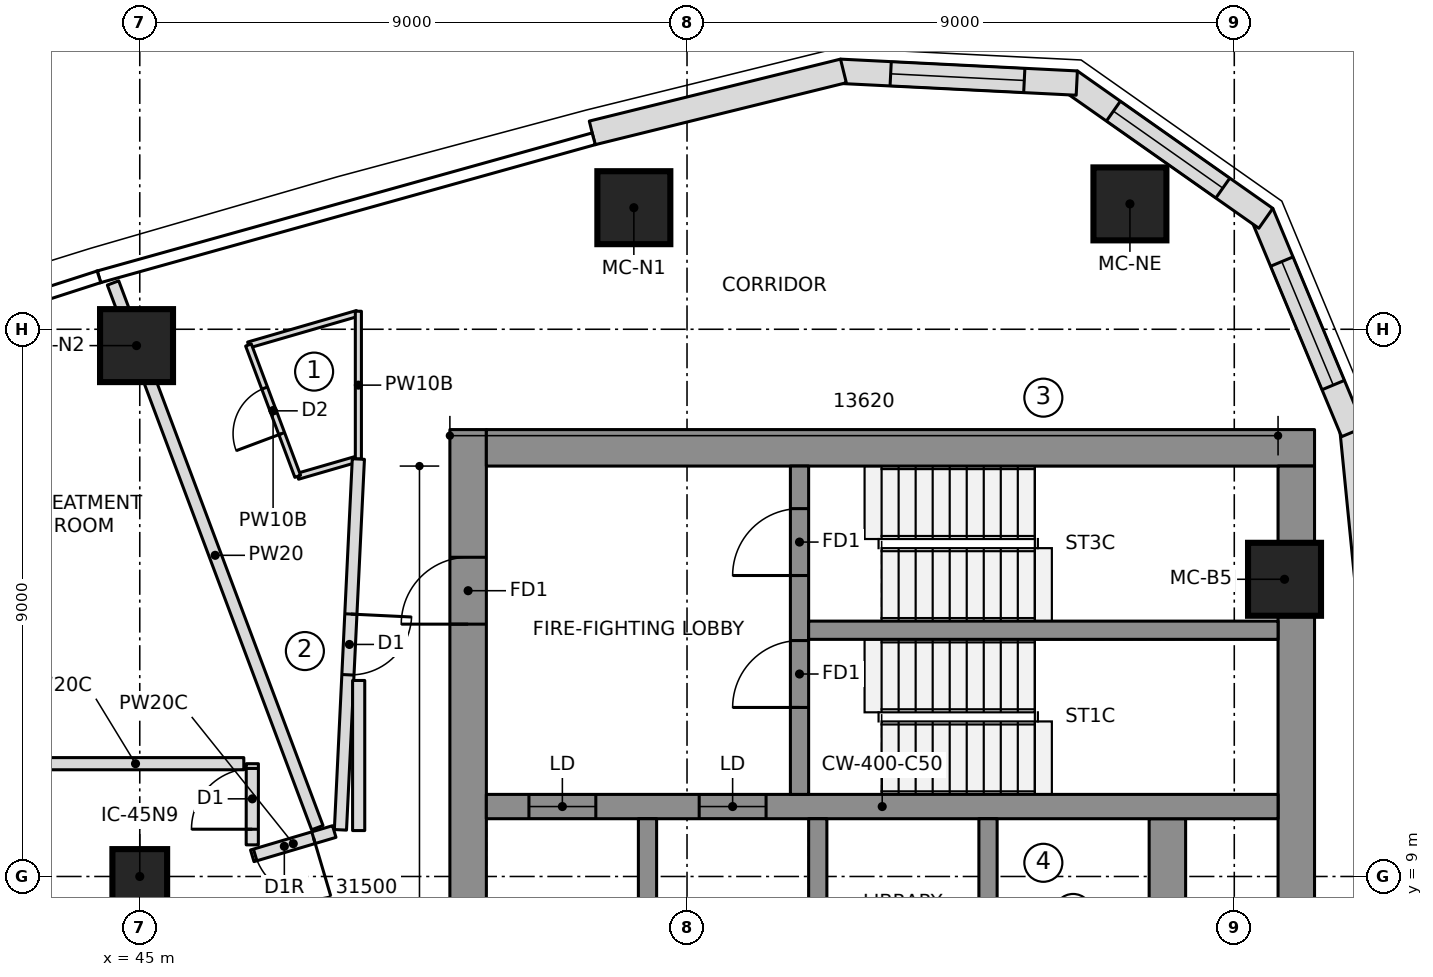
"""IFC4 building model, lengths in metres.
Left out: names, types, materials, properties, quantities, classifications, styles, units other than length and angle.
Written with IfcOpenShell. Run it as: python <this file> out.ifc"""

import sys

from ifc_helpers import new_model, si_unit, direction, frame, frame_2d, origin, origin_2d, place, context, subcontext, project, spatial, polyline, rectangle, outline, extrude, element, fill, save


model = new_model("IFC4")
c1 = context("Model", 3, precision=1e-05, world=origin(), true_north=direction((0.0, 1.0)))
c2 = subcontext(c1, "Body", "Model", "MODEL_VIEW")
j1 = project(units=[si_unit("LENGTHUNIT", "METRE"), si_unit("PLANEANGLEUNIT", "RADIAN")], contexts=[c1])
p1 = place(None, origin())
s1 = spatial("IfcSite", under=j1, at=p1, CompositionType="ELEMENT")
p2 = place(p1, origin())
s2 = spatial("IfcBuilding", under=s1, at=p2, CompositionType="ELEMENT")
p3 = place(p2, frame((0.0, 0.0, 245.65)))
s3 = spatial("IfcBuildingStorey", under=s2, at=p3, CompositionType="ELEMENT", Elevation=245.65)
p4 = place(p3, frame((50.4, 6.65, 0.0), z_axis=(0.0, 0.0, 1.0), x_axis=(0.0, 1.0, 0.0)))
e1 = element("IfcWall", 1, at=p4, inside=s3, PredefinedType="SHEAR", context=c2, shape_type="SweptSolid", body=[
    extrude(rectangle(XDim=9.7, YDim=0.6, at=frame_2d((4.85, 0.0))), origin(), (0.0, 0.0, 1.0), 3.55),
])
p5 = place(p4, frame((6.5, 0.0, 0.0)))
e2 = element("IfcOpeningElement", 2, at=p5, cuts=e1, PredefinedType="OPENING", context=c2, shape_type="SweptSolid", body=[
    extrude(rectangle(XDim=1.1, YDim=2.1, at=frame_2d((0.55, 1.05))), frame((0.0, 0.31, 0.0), z_axis=(0.0, -1.0, 0.0), x_axis=(1.0, 0.0, 0.0)), (0.0, 0.0, 1.0), 0.62),
])
p6 = place(p3, frame((50.7, 16.05, 0.0), z_axis=(0.0, 0.0, 1.0), x_axis=(1.0, 0.0, 0.0)))
e3 = element("IfcWall", 3, at=p6, inside=s3, PredefinedType="SHEAR", context=c2, shape_type="SweptSolid", body=[
    extrude(rectangle(XDim=13.62, YDim=0.6, at=frame_2d((6.81, 0.0))), origin(), (0.0, 0.0, 1.0), 3.55),
])
p7 = place(p3, frame((64.02, 7.502, 0.0), z_axis=(0.0, 0.0, 1.0), x_axis=(0.0, 1.0, 0.0)))
e4 = element("IfcWall", 4, at=p7, inside=s3, PredefinedType="SHEAR", context=c2, shape_type="SweptSolid", body=[
    extrude(rectangle(XDim=8.248, YDim=0.6, at=frame_2d((4.124, 0.0))), origin(), (0.0, 0.0, 1.0), 3.55),
])
p8 = place(p3, frame((61.9, -9.95, 0.0), z_axis=(0.0, 0.0, 1.0), x_axis=(0.0, 1.0, 0.0)))
e5 = element("IfcWall", 5, at=p8, inside=s3, PredefinedType="SHEAR", context=c2, shape_type="SweptSolid", body=[
    extrude(rectangle(XDim=19.9, YDim=0.6, at=frame_2d((9.95, 0.0))), origin(), (0.0, 0.0, 1.0), 3.55),
])
p9 = place(p3, frame((50.7, 10.15, 0.0), z_axis=(0.0, 0.0, 1.0), x_axis=(1.0, 0.0, 0.0)))
e6 = element("IfcWall", 6, at=p9, inside=s3, PredefinedType="SHEAR", context=c2, shape_type="SweptSolid", body=[
    extrude(rectangle(XDim=13.02, YDim=0.4, at=frame_2d((6.51, 0.0))), origin(), (0.0, 0.0, 1.0), 3.55),
])
p10 = place(p9, frame((0.7, 0.0, 0.0)))
e7 = element("IfcOpeningElement", 7, at=p10, cuts=e6, PredefinedType="OPENING", context=c2, shape_type="SweptSolid", body=[
    extrude(rectangle(XDim=1.1, YDim=2.1, at=frame_2d((0.55, 1.05))), frame((0.0, 0.21, 0.0), z_axis=(0.0, -1.0, 0.0), x_axis=(1.0, 0.0, 0.0)), (0.0, 0.0, 1.0), 0.42),
])
p11 = place(p9, frame((3.5, 0.0, 0.0)))
e8 = element("IfcOpeningElement", 8, at=p11, cuts=e6, PredefinedType="OPENING", context=c2, shape_type="SweptSolid", body=[
    extrude(rectangle(XDim=1.1, YDim=2.1, at=frame_2d((0.55, 1.05))), frame((0.0, 0.21, 0.0), z_axis=(0.0, -1.0, 0.0), x_axis=(1.0, 0.0, 0.0)), (0.0, 0.0, 1.0), 0.42),
])
for number, where, z_axis, x_axis in (
    (9, (53.35, 6.95, 0.0), (0.0, 0.0, 1.0), (0.0, 1.0, 0.0)),
    (10, (56.15, 6.95, 0.0), (0.0, 0.0, 1.0), (0.0, 1.0, 0.0)),
    (11, (58.95, 6.95, 0.0), (0.0, 0.0, 1.0), (0.0, 1.0, 0.0)),
):
    element("IfcWall", number, at=place(p3, frame(where, z_axis=z_axis, x_axis=x_axis)), inside=s3, PredefinedType="SHEAR", context=c2, shape_type="SweptSolid", body=[
        extrude(rectangle(XDim=3.0, YDim=0.3, at=frame_2d((1.5, 0.0))), origin(), (0.0, 0.0, 1.0), 3.55),
    ])
p12 = place(p3, frame((55.85, 10.35, 0.0), z_axis=(0.0, 0.0, 1.0), x_axis=(0.0, 1.0, 0.0)))
e12 = element("IfcWall", 12, at=p12, inside=s3, PredefinedType="SHEAR", context=c2, shape_type="SweptSolid", body=[
    extrude(rectangle(XDim=5.4, YDim=0.3, at=frame_2d((2.7, 0.0))), origin(), (0.0, 0.0, 1.0), 3.55),
])
p13 = place(p12, frame((1.43, 0.0, 0.0)))
e13 = element("IfcOpeningElement", 13, at=p13, cuts=e12, PredefinedType="OPENING", context=c2, shape_type="SweptSolid", body=[
    extrude(rectangle(XDim=1.1, YDim=2.1, at=frame_2d((0.55, 1.05))), frame((0.0, 0.16, 0.0), z_axis=(0.0, -1.0, 0.0), x_axis=(1.0, 0.0, 0.0)), (0.0, 0.0, 1.0), 0.32),
])
p14 = place(p12, frame((3.6, 0.0, 0.0)))
e14 = element("IfcOpeningElement", 14, at=p14, cuts=e12, PredefinedType="OPENING", context=c2, shape_type="SweptSolid", body=[
    extrude(rectangle(XDim=1.1, YDim=2.1, at=frame_2d((0.55, 1.05))), frame((0.0, 0.16, 0.0), z_axis=(0.0, -1.0, 0.0), x_axis=(1.0, 0.0, 0.0)), (0.0, 0.0, 1.0), 0.32),
])
p15 = place(p3, frame((56.0, 13.05, 0.0), z_axis=(0.0, 0.0, 1.0), x_axis=(1.0, 0.0, 0.0)))
e15 = element("IfcWall", 15, at=p15, inside=s3, PredefinedType="SHEAR", context=c2, shape_type="SweptSolid", body=[
    extrude(rectangle(XDim=7.72, YDim=0.3, at=frame_2d((3.86, 0.0))), origin(), (0.0, 0.0, 1.0), 3.55),
])
for number, where, z_axis, x_axis in (
    (16, (63.826, 13.888, 0.0), (0.0, 0.0, 1.0), (1.0, 0.0, 0.0)),
    (17, (61.284, 20.062, 0.0), (0.0, 0.0, 1.0), (1.0, 0.0, 0.0)),
    (18, (53.125, 20.0, 0.0), (0.0, 0.0, 1.0), (1.0, 0.0, 0.0)),
    (19, (44.947, 17.731, 0.0), (0.0, 0.0, 1.0), (1.0, 0.0, 0.0)),
):
    element("IfcColumn", number, at=place(p3, frame(where, z_axis=z_axis, x_axis=x_axis)), inside=s3, PredefinedType="COLUMN", context=c2, shape_type="SweptSolid", body=[
        extrude(rectangle(XDim=1.2, YDim=1.2, at=origin_2d()), origin(), (0.0, 0.0, 1.0), 3.55),
    ])
p16 = place(p3, frame((45.0, 9.0, 0.0), z_axis=(0.0, 0.0, 1.0), x_axis=(1.0, 0.0, 0.0)))
e20 = element("IfcColumn", 20, at=p16, inside=s3, PredefinedType="COLUMN", context=c2, shape_type="SweptSolid", body=[
    extrude(rectangle(XDim=0.9, YDim=0.9, at=origin_2d()), origin(), (0.0, 0.0, 1.0), 3.55),
])
p17 = place(p3, frame((65.342, 12.264, 0.0), z_axis=(0.0, 0.0, 1.0), x_axis=(-0.098718218066, 0.995115427185, 0.0)))
e21 = element("IfcWall", 21, at=p17, inside=s3, PredefinedType="NOTDEFINED", context=c2, shape_type="SweptSolid", body=[
    extrude(outline(polyline([(-0.003, -0.2), (4.123, -0.2), (4.063, 0.2), (0.003, 0.2), (-0.003, -0.2)])), origin(), (0.0, 0.0, 1.0), 3.25),
])
p18 = place(p3, frame((64.938, 16.337, 0.0), z_axis=(0.0, 0.0, 1.0), x_axis=(-0.3844335483, 0.923152667191, 0.0)))
e22 = element("IfcWall", 22, at=p18, inside=s3, PredefinedType="NOTDEFINED", context=c2, shape_type="SweptSolid", body=[
    extrude(outline(polyline([(-0.03, -0.2), (3.871, -0.2), (3.756, 0.2), (0.03, 0.2), (-0.03, -0.2)])), origin(), (0.0, 0.0, 1.0), 3.25),
])
p19 = place(p18, frame((0.807, 0.0, 0.6)))
e23 = element("IfcOpeningElement", 23, at=p19, cuts=e22, PredefinedType="OPENING", context=c2, shape_type="SweptSolid", body=[
    extrude(outline(polyline([(0.0, 1.35), (0.084, 1.771), (0.322, 2.128), (0.679, 2.366), (1.1, 2.45), (1.521, 2.366), (1.878, 2.128), (2.116, 1.771), (2.2, 1.35), (2.2, 1.1), (2.116, 0.679), (1.878, 0.322), (1.521, 0.084), (1.1, 0.0), (0.679, 0.084), (0.322, 0.322), (0.084, 0.679), (0.0, 1.1), (0.0, 1.35)])), frame((0.0, 0.21, 0.0), z_axis=(0.0, -1.0, 0.0), x_axis=(1.0, 0.0, 0.0)), (0.0, 0.0, 1.0), 0.42),
])
p20 = place(p3, frame((63.471, 19.858, 0.0), z_axis=(0.0, 0.0, 1.0), x_axis=(-0.817942545532, 0.575299915009, 0.0)))
e24 = element("IfcWall", 24, at=p20, inside=s3, PredefinedType="NOTDEFINED", context=c2, shape_type="SweptSolid", body=[
    extrude(outline(polyline([(-0.058, -0.2), (3.871, -0.2), (3.756, 0.2), (0.058, 0.2), (-0.058, -0.2)])), origin(), (0.0, 0.0, 1.0), 3.25),
])
p21 = place(p20, frame((0.807, 0.0, 0.6)))
e25 = element("IfcOpeningElement", 25, at=p21, cuts=e24, PredefinedType="OPENING", context=c2, shape_type="SweptSolid", body=[
    extrude(outline(polyline([(0.0, 1.35), (0.084, 1.771), (0.322, 2.128), (0.679, 2.366), (1.1, 2.45), (1.521, 2.366), (1.878, 2.128), (2.116, 1.771), (2.2, 1.35), (2.2, 1.1), (2.116, 0.679), (1.878, 0.322), (1.521, 0.084), (1.1, 0.0), (0.679, 0.084), (0.322, 0.322), (0.084, 0.679), (0.0, 1.1), (0.0, 1.35)])), frame((0.0, 0.21, 0.0), z_axis=(0.0, -1.0, 0.0), x_axis=(1.0, 0.0, 0.0)), (0.0, 0.0, 1.0), 0.42),
])
p22 = place(p3, frame((60.352, 22.052, 0.0), z_axis=(0.0, 0.0, 1.0), x_axis=(-0.998758875872, 0.049806705046, 0.0)))
e26 = element("IfcWall", 26, at=p22, inside=s3, PredefinedType="NOTDEFINED", context=c2, shape_type="SweptSolid", body=[
    extrude(outline(polyline([(-0.058, -0.2), (3.843, -0.2), (3.784, 0.2), (0.058, 0.2), (-0.058, -0.2)])), origin(), (0.0, 0.0, 1.0), 3.25),
])
p23 = place(p22, frame((0.807, 0.0, 0.6)))
e27 = element("IfcOpeningElement", 27, at=p23, cuts=e26, PredefinedType="OPENING", context=c2, shape_type="SweptSolid", body=[
    extrude(outline(polyline([(0.0, 1.35), (0.084, 1.771), (0.322, 2.128), (0.679, 2.366), (1.1, 2.45), (1.521, 2.366), (1.878, 2.128), (2.116, 1.771), (2.2, 1.35), (2.2, 1.1), (2.116, 0.679), (1.878, 0.322), (1.521, 0.084), (1.1, 0.0), (0.679, 0.084), (0.322, 0.322), (0.084, 0.679), (0.0, 1.1), (0.0, 1.35)])), frame((0.0, 0.21, 0.0), z_axis=(0.0, -1.0, 0.0), x_axis=(1.0, 0.0, 0.0)), (0.0, 0.0, 1.0), 0.42),
])
p24 = place(p3, frame((56.543, 22.242, 0.0), z_axis=(0.0, 0.0, 1.0), x_axis=(-0.970902342456, -0.23947576373, 0.0)))
e28 = element("IfcWall", 28, at=p24, inside=s3, PredefinedType="NOTDEFINED", context=c2, shape_type="SweptSolid", body=[
    extrude(outline(polyline([(-0.029, -0.2), (4.226, -0.2), (4.226, 0.2), (0.029, 0.2), (-0.029, -0.2)])), origin(), (0.0, 0.0, 1.0), 3.25),
])
p25 = place(p3, frame((48.198, 9.739, 0.0), z_axis=(0.0, 0.0, 1.0), x_axis=(-0.958866391875, -0.283857785753, 0.0)))
e29 = element("IfcWall", 29, at=p25, inside=s3, PredefinedType="PARTITIONING", context=c2, shape_type="SweptSolid", body=[
    extrude(rectangle(XDim=1.406, YDim=0.2, at=frame_2d((0.703, 0.0))), origin(), (0.0, 0.0, 1.0), 3.25),
])
p26 = place(p25, frame((0.356, 0.0, 0.0)))
e30 = element("IfcOpeningElement", 30, at=p26, cuts=e29, PredefinedType="OPENING", context=c2, shape_type="SweptSolid", body=[
    extrude(rectangle(XDim=1.0, YDim=2.1, at=frame_2d((0.5, 1.05))), frame((0.0, 0.11, 0.0), z_axis=(0.0, -1.0, 0.0), x_axis=(1.0, 0.0, 0.0)), (0.0, 0.0, 1.0), 0.22),
])
p27 = place(p3, frame((47.92, 9.803, 0.0), z_axis=(0.0, 0.0, 1.0), x_axis=(-0.351123441588, 0.936329177569, 0.0)))
e31 = element("IfcWall", 31, at=p27, inside=s3, PredefinedType="PARTITIONING", context=c2, shape_type="SweptSolid", body=[
    extrude(rectangle(XDim=9.568, YDim=0.2, at=frame_2d((4.784, 0.0))), origin(), (0.0, 0.0, 1.0), 3.25),
])
p28 = place(p3, frame((46.788, 17.741, 0.0), z_axis=(0.0, 0.0, 1.0), x_axis=(0.960473980386, 0.278369777458, 0.0)))
e32 = element("IfcWall", 32, at=p28, inside=s3, PredefinedType="PARTITIONING", context=c2, shape_type="SweptSolid", body=[
    extrude(rectangle(XDim=1.864, YDim=0.1, at=frame_2d((0.932, 0.0))), origin(), (0.0, 0.0, 1.0), 3.25),
])
p29 = place(p3, frame((48.576, 15.865, 0.0), z_axis=(0.0, 0.0, 1.0), x_axis=(-0.960468222897, -0.278389642057, 0.0)))
e33 = element("IfcWall", 33, at=p29, inside=s3, PredefinedType="PARTITIONING", context=c2, shape_type="SweptSolid", body=[
    extrude(rectangle(XDim=1.019, YDim=0.1, at=frame_2d((0.51, 0.0))), origin(), (0.0, 0.0, 1.0), 3.25),
])
p30 = place(p3, frame((47.598, 15.582, 0.0), z_axis=(0.0, 0.0, 1.0), x_axis=(-0.351158236187, 0.936316128857, 0.0)))
e34 = element("IfcWall", 34, at=p30, inside=s3, PredefinedType="PARTITIONING", context=c2, shape_type="SweptSolid", body=[
    extrude(rectangle(XDim=2.307, YDim=0.1, at=frame_2d((1.153, 0.0))), origin(), (0.0, 0.0, 1.0), 3.25),
])
p31 = place(p30, frame((0.75, 0.0, 0.0)))
e35 = element("IfcOpeningElement", 35, at=p31, cuts=e34, PredefinedType="OPENING", context=c2, shape_type="SweptSolid", body=[
    extrude(rectangle(XDim=0.8, YDim=2.1, at=frame_2d((0.4, 1.05))), frame((0.0, 0.06, 0.0), z_axis=(0.0, -1.0, 0.0), x_axis=(1.0, 0.0, 0.0)), (0.0, 0.0, 1.0), 0.12),
])
p32 = place(p3, frame((48.595, 18.296, 0.0), z_axis=(0.0, 0.0, 1.0), x_axis=(0.0, -1.0, 0.0)))
e36 = element("IfcWall", 36, at=p32, inside=s3, PredefinedType="PARTITIONING", context=c2, shape_type="SweptSolid", body=[
    extrude(rectangle(XDim=2.431, YDim=0.1, at=frame_2d((1.215, 0.0))), origin(), (0.0, 0.0, 1.0), 3.25),
])
p33 = place(p3, frame((48.595, 15.866, 0.0), z_axis=(0.0, 0.0, 1.0), x_axis=(-0.048302241024, -0.998832765538, 0.0)))
e37 = element("IfcWall", 37, at=p33, inside=s3, PredefinedType="PARTITIONING", context=c2, shape_type="SweptSolid", body=[
    extrude(rectangle(XDim=6.106, YDim=0.2, at=frame_2d((3.053, 0.0))), origin(), (0.0, 0.0, 1.0), 3.25),
])
p34 = place(p33, frame((2.553, 0.0, 0.0)))
e38 = element("IfcOpeningElement", 38, at=p34, cuts=e37, PredefinedType="OPENING", context=c2, shape_type="SweptSolid", body=[
    extrude(rectangle(XDim=1.0, YDim=2.1, at=frame_2d((0.5, 1.05))), frame((0.0, 0.11, 0.0), z_axis=(0.0, -1.0, 0.0), x_axis=(1.0, 0.0, 0.0)), (0.0, 0.0, 1.0), 0.22),
])
p35 = place(p3, frame((46.85, 9.52, 0.0), z_axis=(0.0, 0.0, 1.0), x_axis=(0.0007315287, 0.999999732433, 0.0)))
e39 = element("IfcWall", 39, at=p35, inside=s3, PredefinedType="PARTITIONING", context=c2, shape_type="SweptSolid", body=[
    extrude(rectangle(XDim=1.335, YDim=0.2, at=frame_2d((0.667, 0.0))), origin(), (0.0, 0.0, 1.0), 3.25),
])
p36 = place(p35, frame((0.257, 0.0, 0.0)))
e40 = element("IfcOpeningElement", 40, at=p36, cuts=e39, PredefinedType="OPENING", context=c2, shape_type="SweptSolid", body=[
    extrude(rectangle(XDim=1.0, YDim=2.1, at=frame_2d((0.5, 1.05))), frame((0.0, 0.11, 0.0), z_axis=(0.0, -1.0, 0.0), x_axis=(1.0, 0.0, 0.0)), (0.0, 0.0, 1.0), 0.22),
])
p37 = place(p3, frame((46.711, 10.855, 0.0), z_axis=(0.0, 0.0, 1.0), x_axis=(-1.0, 0.0, 0.0)))
e41 = element("IfcWall", 41, at=p37, inside=s3, PredefinedType="PARTITIONING", context=c2, shape_type="SweptSolid", body=[
    extrude(rectangle(XDim=3.562, YDim=0.2, at=frame_2d((1.781, 0.0))), origin(), (0.0, 0.0, 1.0), 3.25),
])
p38 = place(p3, frame((48.6, 9.755, 0.0), z_axis=(0.0, 0.0, 1.0), x_axis=(0.0, 1.0, 0.0)))
e42 = element("IfcWall", 42, at=p38, inside=s3, PredefinedType="PARTITIONING", context=c2, shape_type="SweptSolid", body=[
    extrude(rectangle(XDim=2.469, YDim=0.2, at=frame_2d((1.234, 0.0))), origin(), (0.0, 0.0, 1.0), 3.25),
])
p39 = place(p19, origin())
e43 = element("IfcWindow", 43, at=p39, inside=s3, PartitioningType="SINGLE_PANEL", PredefinedType="WINDOW", context=c2, shape_type="SweptSolid", body=[
    extrude(outline(polyline([(0.0, 1.35), (0.084, 1.771), (0.322, 2.128), (0.679, 2.366), (1.1, 2.45), (1.521, 2.366), (1.878, 2.128), (2.116, 1.771), (2.2, 1.35), (2.2, 1.1), (2.116, 0.679), (1.878, 0.322), (1.521, 0.084), (1.1, 0.0), (0.679, 0.084), (0.322, 0.322), (0.084, 0.679), (0.0, 1.1), (0.0, 1.35)])), frame((0.0, 0.17, 0.0), z_axis=(0.0, -1.0, 0.0), x_axis=(1.0, 0.0, 0.0)), (0.0, 0.0, 1.0), 0.06),
])
fill(e23, e43)
p40 = place(p21, origin())
e44 = element("IfcWindow", 44, at=p40, inside=s3, PartitioningType="SINGLE_PANEL", PredefinedType="WINDOW", context=c2, shape_type="SweptSolid", body=[
    extrude(outline(polyline([(0.0, 1.35), (0.084, 1.771), (0.322, 2.128), (0.679, 2.366), (1.1, 2.45), (1.521, 2.366), (1.878, 2.128), (2.116, 1.771), (2.2, 1.35), (2.2, 1.1), (2.116, 0.679), (1.878, 0.322), (1.521, 0.084), (1.1, 0.0), (0.679, 0.084), (0.322, 0.322), (0.084, 0.679), (0.0, 1.1), (0.0, 1.35)])), frame((0.0, 0.17, 0.0), z_axis=(0.0, -1.0, 0.0), x_axis=(1.0, 0.0, 0.0)), (0.0, 0.0, 1.0), 0.06),
])
fill(e25, e44)
p41 = place(p23, origin())
e45 = element("IfcWindow", 45, at=p41, inside=s3, PartitioningType="SINGLE_PANEL", PredefinedType="WINDOW", context=c2, shape_type="SweptSolid", body=[
    extrude(outline(polyline([(0.0, 1.35), (0.084, 1.771), (0.322, 2.128), (0.679, 2.366), (1.1, 2.45), (1.521, 2.366), (1.878, 2.128), (2.116, 1.771), (2.2, 1.35), (2.2, 1.1), (2.116, 0.679), (1.878, 0.322), (1.521, 0.084), (1.1, 0.0), (0.679, 0.084), (0.322, 0.322), (0.084, 0.679), (0.0, 1.1), (0.0, 1.35)])), frame((0.0, 0.17, 0.0), z_axis=(0.0, -1.0, 0.0), x_axis=(1.0, 0.0, 0.0)), (0.0, 0.0, 1.0), 0.06),
])
fill(e27, e45)
p42 = place(p26, origin())
e46 = element("IfcDoor", 46, at=p42, inside=s3, OperationType="SINGLE_SWING_RIGHT", PredefinedType="DOOR", context=c2, shape_type="SweptSolid", body=[
    extrude(rectangle(XDim=1.0, YDim=2.1, at=frame_2d((0.5, 1.05))), frame((0.0, 0.025, 0.0), z_axis=(0.0, -1.0, 0.0), x_axis=(1.0, 0.0, 0.0)), (0.0, 0.0, 1.0), 0.05),
])
fill(e30, e46)
p43 = place(p31, origin())
e47 = element("IfcDoor", 47, at=p43, inside=s3, OperationType="SINGLE_SWING_LEFT", PredefinedType="DOOR", context=c2, shape_type="SweptSolid", body=[
    extrude(rectangle(XDim=0.8, YDim=2.1, at=frame_2d((0.4, 1.05))), frame((0.0, 0.025, 0.0), z_axis=(0.0, -1.0, 0.0), x_axis=(1.0, 0.0, 0.0)), (0.0, 0.0, 1.0), 0.05),
])
fill(e35, e47)
p44 = place(p34, origin())
e48 = element("IfcDoor", 48, at=p44, inside=s3, OperationType="SINGLE_SWING_LEFT", PredefinedType="DOOR", context=c2, shape_type="SweptSolid", body=[
    extrude(rectangle(XDim=1.0, YDim=2.1, at=frame_2d((0.5, 1.05))), frame((0.0, 0.025, 0.0), z_axis=(0.0, -1.0, 0.0), x_axis=(1.0, 0.0, 0.0)), (0.0, 0.0, 1.0), 0.05),
])
fill(e38, e48)
p45 = place(p36, origin())
e49 = element("IfcDoor", 49, at=p45, inside=s3, OperationType="SINGLE_SWING_LEFT", PredefinedType="DOOR", context=c2, shape_type="SweptSolid", body=[
    extrude(rectangle(XDim=1.0, YDim=2.1, at=frame_2d((0.5, 1.05))), frame((0.0, 0.025, 0.0), z_axis=(0.0, -1.0, 0.0), x_axis=(1.0, 0.0, 0.0)), (0.0, 0.0, 1.0), 0.05),
])
fill(e40, e49)
p46 = place(p10, origin())
e50 = element("IfcDoor", 50, at=p46, inside=s3, OperationType="DOUBLE_DOOR_SLIDING", PredefinedType="DOOR", context=c2, shape_type="SweptSolid", body=[
    extrude(rectangle(XDim=1.1, YDim=2.1, at=frame_2d((0.55, 1.05))), frame((0.0, 0.025, 0.0), z_axis=(0.0, -1.0, 0.0), x_axis=(1.0, 0.0, 0.0)), (0.0, 0.0, 1.0), 0.05),
])
fill(e7, e50)
p47 = place(p11, origin())
e51 = element("IfcDoor", 51, at=p47, inside=s3, OperationType="DOUBLE_DOOR_SLIDING", PredefinedType="DOOR", context=c2, shape_type="SweptSolid", body=[
    extrude(rectangle(XDim=1.1, YDim=2.1, at=frame_2d((0.55, 1.05))), frame((0.0, 0.025, 0.0), z_axis=(0.0, -1.0, 0.0), x_axis=(1.0, 0.0, 0.0)), (0.0, 0.0, 1.0), 0.05),
])
fill(e8, e51)
p48 = place(p13, origin())
e52 = element("IfcDoor", 52, at=p48, inside=s3, OperationType="SINGLE_SWING_RIGHT", PredefinedType="DOOR", context=c2, shape_type="SweptSolid", body=[
    extrude(rectangle(XDim=1.1, YDim=2.1, at=frame_2d((0.55, 1.05))), frame((0.0, 0.025, 0.0), z_axis=(0.0, -1.0, 0.0), x_axis=(1.0, 0.0, 0.0)), (0.0, 0.0, 1.0), 0.05),
])
fill(e13, e52)
p49 = place(p14, origin())
e53 = element("IfcDoor", 53, at=p49, inside=s3, OperationType="SINGLE_SWING_RIGHT", PredefinedType="DOOR", context=c2, shape_type="SweptSolid", body=[
    extrude(rectangle(XDim=1.1, YDim=2.1, at=frame_2d((0.55, 1.05))), frame((0.0, 0.025, 0.0), z_axis=(0.0, -1.0, 0.0), x_axis=(1.0, 0.0, 0.0)), (0.0, 0.0, 1.0), 0.05),
])
fill(e14, e53)
p50 = place(p5, origin())
e54 = element("IfcDoor", 54, at=p50, inside=s3, OperationType="SINGLE_SWING_RIGHT", PredefinedType="DOOR", context=c2, shape_type="SweptSolid", body=[
    extrude(rectangle(XDim=1.1, YDim=2.1, at=frame_2d((0.55, 1.05))), frame((0.0, 0.025, 0.0), z_axis=(0.0, -1.0, 0.0), x_axis=(1.0, 0.0, 0.0)), (0.0, 0.0, 1.0), 0.05),
])
fill(e2, e54)
save(model, sys.argv[1])
